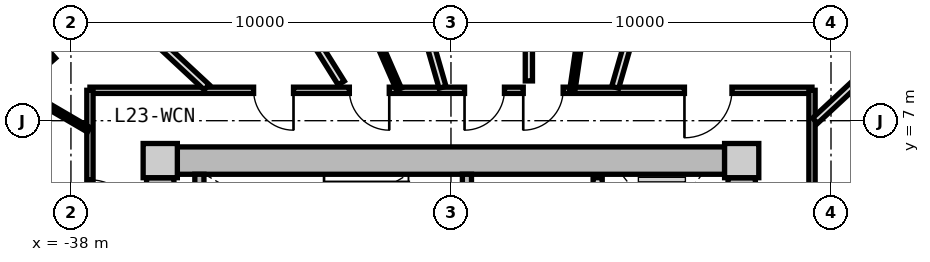
"""IFC4 building model, lengths in metres.
Left out: names, types, materials, properties, quantities, classifications, styles, units other than length and angle.
Written with IfcOpenShell. Run it as: python <this file> out.ifc"""

import sys

from ifc_helpers import new_model, si_unit, direction, frame, frame_2d, origin, origin_2d, place, context, subcontext, project, spatial, rectangle, extrude, source, transform, mapped, element, fill, save


model = new_model("IFC4")
c1 = context("Model", 3, precision=1e-05, world=origin(), true_north=direction((0.0, 1.0)))
c2 = subcontext(c1, "Body", "Model", "MODEL_VIEW")
j1 = project(units=[si_unit("LENGTHUNIT", "METRE"), si_unit("PLANEANGLEUNIT", "RADIAN")], contexts=[c1])
p1 = place(None, origin())
s1 = spatial("IfcSite", under=j1, at=p1, CompositionType="ELEMENT")
p2 = place(p1, origin())
s2 = spatial("IfcBuilding", under=s1, at=p2, CompositionType="ELEMENT")
p3 = place(p2, frame((0.0, 0.0, 77.95)))
s3 = spatial("IfcBuildingStorey", under=s2, at=p3, CompositionType="ELEMENT", Elevation=77.95)
m1 = source(origin(), c2, "Body", "SweptSolid", [
    extrude(rectangle(XDim=0.9, YDim=0.9, at=origin_2d()), origin(), (0.0, 0.0, 1.0), 3.05),
])
for number, where, z_axis, x_axis in (
    (1, (-20.35, 5.95, 0.0), (0.0, 0.0, 1.0), (1.0, 0.0, 0.0)),
    (2, (-35.65, 5.95, 0.0), (0.0, 0.0, 1.0), (1.0, 0.0, 0.0)),
):
    element("IfcColumn", number, at=place(p3, frame(where, z_axis=z_axis, x_axis=x_axis)), inside=s3, PredefinedType="COLUMN", context=c2, shape_type="MappedRepresentation", body=[
        mapped(m1, transform((0.0, 0.0, 0.0), x_axis=(1.0, 0.0, 0.0), y_axis=(0.0, 1.0, 0.0), z_axis=(0.0, 0.0, 1.0), scale=1.0)),
    ])
m2 = source(origin(), c2, "Body", "SweptSolid", [
    extrude(rectangle(XDim=14.4, YDim=0.72, at=frame_2d((7.2, 0.0))), origin(), (0.0, 0.0, 1.0), 2.79),
])
p4 = place(p3, frame((-35.2, 5.95, 0.0), z_axis=(0.0, 0.0, 1.0), x_axis=(1.0, 0.0, 0.0)))
e3 = element("IfcWall", 3, at=p4, inside=s3, PredefinedType="SHEAR", context=c2, shape_type="MappedRepresentation", body=[
    mapped(m2, transform((0.0, 0.0, 0.0), x_axis=(1.0, 0.0, 0.0), y_axis=(0.0, 1.0, 0.0), z_axis=(0.0, 0.0, 1.0), scale=1.0)),
])
m3 = source(origin(), c2, "Body", "SweptSolid", [
    extrude(rectangle(XDim=11.0, YDim=0.72, at=frame_2d((5.5, 0.0))), origin(), (0.0, 0.0, 1.0), 2.79),
])
p5 = place(p3, frame((-35.65, -5.5, 0.0), z_axis=(0.0, 0.0, 1.0), x_axis=(0.0, 1.0, 0.0)))
e4 = element("IfcWall", 4, at=p5, inside=s3, PredefinedType="SHEAR", context=c2, shape_type="MappedRepresentation", body=[
    mapped(m3, transform((0.0, 0.0, 0.0), x_axis=(1.0, 0.0, 0.0), y_axis=(0.0, 1.0, 0.0), z_axis=(0.0, 0.0, 1.0), scale=1.0)),
])
p6 = place(p5, frame((3.8, 0.0, 0.0)))
e5 = element("IfcOpeningElement", 5, at=p6, cuts=e4, PredefinedType="OPENING", context=c2, shape_type="SweptSolid", body=[
    extrude(rectangle(XDim=1.2, YDim=2.15, at=frame_2d((0.6, 1.075))), frame((0.0, 0.37, 0.0), z_axis=(0.0, -1.0, 0.0), x_axis=(1.0, 0.0, 0.0)), (0.0, 0.0, 1.0), 0.74),
])
p7 = place(p3, frame((-20.35, 5.5, 0.0), z_axis=(0.0, 0.0, 1.0), x_axis=(0.0, -1.0, 0.0)))
e6 = element("IfcWall", 6, at=p7, inside=s3, PredefinedType="SHEAR", context=c2, shape_type="MappedRepresentation", body=[
    mapped(m3, transform((0.0, 0.0, 0.0), x_axis=(1.0, 0.0, 0.0), y_axis=(0.0, 1.0, 0.0), z_axis=(0.0, 0.0, 1.0), scale=1.0)),
])
p8 = place(p7, frame((5.65, 0.0, 0.0)))
e7 = element("IfcOpeningElement", 7, at=p8, cuts=e6, PredefinedType="OPENING", context=c2, shape_type="SweptSolid", body=[
    extrude(rectangle(XDim=1.2, YDim=2.15, at=frame_2d((0.6, 1.075))), frame((0.0, 0.37, 0.0), z_axis=(0.0, -1.0, 0.0), x_axis=(1.0, 0.0, 0.0)), (0.0, 0.0, 1.0), 0.74),
])
p9 = place(p7, frame((9.3, 0.0, 0.0)))
e8 = element("IfcOpeningElement", 8, at=p9, cuts=e6, PredefinedType="OPENING", context=c2, shape_type="SweptSolid", body=[
    extrude(rectangle(XDim=1.0, YDim=2.1, at=frame_2d((0.5, 1.05))), frame((0.0, 0.37, 0.0), z_axis=(0.0, -1.0, 0.0), x_axis=(1.0, 0.0, 0.0)), (0.0, 0.0, 1.0), 0.74),
])
m4 = source(origin(), c2, "Body", "SweptSolid", [
    extrude(rectangle(XDim=3.14, YDim=0.24, at=frame_2d((1.57, 0.0))), origin(), (0.0, 0.0, 1.0), 2.79),
])
p10 = place(p3, frame((-34.62, 2.45, 0.0), z_axis=(0.0, 0.0, 1.0), x_axis=(0.0, 1.0, 0.0)))
e9 = element("IfcWall", 9, at=p10, inside=s3, PredefinedType="PARTITIONING", context=c2, shape_type="MappedRepresentation", body=[
    mapped(m4, transform((0.0, 0.0, 0.0), x_axis=(1.0, 0.0, 0.0), y_axis=(0.0, 1.0, 0.0), z_axis=(0.0, 0.0, 1.0), scale=1.0)),
])
p11 = place(p3, frame((-27.58, 2.45, 0.0), z_axis=(0.0, 0.0, 1.0), x_axis=(0.0, 1.0, 0.0)))
e10 = element("IfcWall", 10, at=p11, inside=s3, PredefinedType="PARTITIONING", context=c2, shape_type="MappedRepresentation", body=[
    mapped(m4, transform((0.0, 0.0, 0.0), x_axis=(1.0, 0.0, 0.0), y_axis=(0.0, 1.0, 0.0), z_axis=(0.0, 0.0, 1.0), scale=1.0)),
])
p12 = place(p11, frame((0.55, 0.0, 0.0)))
e11 = element("IfcOpeningElement", 11, at=p12, cuts=e10, PredefinedType="OPENING", context=c2, shape_type="SweptSolid", body=[
    extrude(rectangle(XDim=1.1, YDim=2.15, at=frame_2d((0.55, 1.075))), frame((0.0, 0.13, 0.0), z_axis=(0.0, -1.0, 0.0), x_axis=(1.0, 0.0, 0.0)), (0.0, 0.0, 1.0), 0.26),
])
m5 = source(origin(), c2, "Body", "SweptSolid", [
    extrude(rectangle(XDim=5.0, YDim=0.24, at=frame_2d((2.5, 0.0))), origin(), (0.0, 0.0, 1.0), 2.775),
])
p13 = place(p3, frame((-24.14, 0.5, 0.0), z_axis=(0.0, 0.0, 1.0), x_axis=(0.0, 1.0, 0.0)))
e12 = element("IfcWall", 12, at=p13, inside=s3, PredefinedType="PARTITIONING", context=c2, shape_type="MappedRepresentation", body=[
    mapped(m5, transform((0.0, 0.0, 0.0), x_axis=(1.0, 0.0, 0.0), y_axis=(0.0, 1.0, 0.0), z_axis=(0.0, 0.0, 1.0), scale=1.0)),
])
p14 = place(p13, frame((3.05, 0.0, 0.0)))
e13 = element("IfcOpeningElement", 13, at=p14, cuts=e12, PredefinedType="OPENING", context=c2, shape_type="SweptSolid", body=[
    extrude(rectangle(XDim=1.3, YDim=2.2, at=frame_2d((0.65, 1.1))), frame((0.0, 0.13, 0.0), z_axis=(0.0, -1.0, 0.0), x_axis=(1.0, 0.0, 0.0)), (0.0, 0.0, 1.0), 0.26),
])
p15 = place(p13, frame((0.55, 0.0, 0.0)))
e14 = element("IfcOpeningElement", 14, at=p15, cuts=e12, PredefinedType="OPENING", context=c2, shape_type="SweptSolid", body=[
    extrude(rectangle(XDim=1.3, YDim=2.2, at=frame_2d((0.65, 1.1))), frame((0.0, 0.13, 0.0), z_axis=(0.0, -1.0, 0.0), x_axis=(1.0, 0.0, 0.0)), (0.0, 0.0, 1.0), 0.26),
])
m6 = source(origin(), c2, "Body", "SweptSolid", [
    extrude(rectangle(XDim=19.0, YDim=0.165, at=frame_2d((9.5, 0.0))), origin(), (0.0, 0.0, 1.0), 2.775),
])
p16 = place(p3, frame((-37.5, 7.8, 0.0), z_axis=(0.0, 0.0, 1.0), x_axis=(1.0, 0.0, 0.0)))
e15 = element("IfcWall", 15, at=p16, inside=s3, PredefinedType="PARTITIONING", context=c2, shape_type="MappedRepresentation", body=[
    mapped(m6, transform((0.0, 0.0, 0.0), x_axis=(1.0, 0.0, 0.0), y_axis=(0.0, 1.0, 0.0), z_axis=(0.0, 0.0, 1.0), scale=1.0)),
])
p17 = place(p16, frame((15.644, 0.0, 0.0)))
e16 = element("IfcOpeningElement", 16, at=p17, cuts=e15, PredefinedType="OPENING", context=c2, shape_type="SweptSolid", body=[
    extrude(rectangle(XDim=1.25, YDim=2.2, at=frame_2d((0.625, 1.1))), frame((0.0, 0.093, 0.0), z_axis=(0.0, -1.0, 0.0), x_axis=(1.0, 0.0, 0.0)), (0.0, 0.0, 1.0), 0.185),
])
p18 = place(p16, frame((11.402, 0.0, 0.0)))
e17 = element("IfcOpeningElement", 17, at=p18, cuts=e15, PredefinedType="OPENING", context=c2, shape_type="SweptSolid", body=[
    extrude(rectangle(XDim=1.05, YDim=2.15, at=frame_2d((0.525, 1.075))), frame((0.0, 0.093, 0.0), z_axis=(0.0, -1.0, 0.0), x_axis=(1.0, 0.0, 0.0)), (0.0, 0.0, 1.0), 0.185),
])
p19 = place(p16, frame((9.857, 0.0, 0.0)))
e18 = element("IfcOpeningElement", 18, at=p19, cuts=e15, PredefinedType="OPENING", context=c2, shape_type="SweptSolid", body=[
    extrude(rectangle(XDim=1.05, YDim=2.15, at=frame_2d((0.525, 1.075))), frame((0.0, 0.093, 0.0), z_axis=(0.0, -1.0, 0.0), x_axis=(1.0, 0.0, 0.0)), (0.0, 0.0, 1.0), 0.185),
])
p20 = place(p16, frame((6.826, 0.0, 0.0)))
e19 = element("IfcOpeningElement", 19, at=p20, cuts=e15, PredefinedType="OPENING", context=c2, shape_type="SweptSolid", body=[
    extrude(rectangle(XDim=1.05, YDim=2.15, at=frame_2d((0.525, 1.075))), frame((0.0, 0.093, 0.0), z_axis=(0.0, -1.0, 0.0), x_axis=(1.0, 0.0, 0.0)), (0.0, 0.0, 1.0), 0.185),
])
p21 = place(p16, frame((4.307, 0.0, 0.0)))
e20 = element("IfcOpeningElement", 20, at=p21, cuts=e15, PredefinedType="OPENING", context=c2, shape_type="SweptSolid", body=[
    extrude(rectangle(XDim=1.05, YDim=2.15, at=frame_2d((0.525, 1.075))), frame((0.0, 0.093, 0.0), z_axis=(0.0, -1.0, 0.0), x_axis=(1.0, 0.0, 0.0)), (0.0, 0.0, 1.0), 0.185),
])
m7 = source(origin(), c2, "Body", "SweptSolid", [
    extrude(rectangle(XDim=15.6, YDim=0.165, at=frame_2d((7.8, 0.0))), origin(), (0.0, 0.0, 1.0), 2.775),
])
p22 = place(p3, frame((-37.5, -7.8, 0.0), z_axis=(0.0, 0.0, 1.0), x_axis=(0.0, 1.0, 0.0)))
e21 = element("IfcWall", 21, at=p22, inside=s3, PredefinedType="PARTITIONING", context=c2, shape_type="MappedRepresentation", body=[
    mapped(m7, transform((0.0, 0.0, 0.0), x_axis=(1.0, 0.0, 0.0), y_axis=(0.0, 1.0, 0.0), z_axis=(0.0, 0.0, 1.0), scale=1.0)),
])
p23 = place(p22, frame((11.994, 0.0, 0.0)))
e22 = element("IfcOpeningElement", 22, at=p23, cuts=e21, PredefinedType="OPENING", context=c2, shape_type="SweptSolid", body=[
    extrude(rectangle(XDim=1.25, YDim=2.2, at=frame_2d((0.625, 1.1))), frame((0.0, 0.093, 0.0), z_axis=(0.0, -1.0, 0.0), x_axis=(1.0, 0.0, 0.0)), (0.0, 0.0, 1.0), 0.185),
])
p24 = place(p22, frame((8.723, 0.0, 0.0)))
e23 = element("IfcOpeningElement", 23, at=p24, cuts=e21, PredefinedType="OPENING", context=c2, shape_type="SweptSolid", body=[
    extrude(rectangle(XDim=1.05, YDim=2.15, at=frame_2d((0.525, 1.075))), frame((0.0, 0.093, 0.0), z_axis=(0.0, -1.0, 0.0), x_axis=(1.0, 0.0, 0.0)), (0.0, 0.0, 1.0), 0.185),
])
p25 = place(p22, frame((5.777, 0.0, 0.0)))
e24 = element("IfcOpeningElement", 24, at=p25, cuts=e21, PredefinedType="OPENING", context=c2, shape_type="SweptSolid", body=[
    extrude(rectangle(XDim=1.05, YDim=2.15, at=frame_2d((0.525, 1.075))), frame((0.0, 0.093, 0.0), z_axis=(0.0, -1.0, 0.0), x_axis=(1.0, 0.0, 0.0)), (0.0, 0.0, 1.0), 0.185),
])
p26 = place(p22, frame((2.676, 0.0, 0.0)))
e25 = element("IfcOpeningElement", 25, at=p26, cuts=e21, PredefinedType="OPENING", context=c2, shape_type="SweptSolid", body=[
    extrude(rectangle(XDim=1.05, YDim=2.15, at=frame_2d((0.525, 1.075))), frame((0.0, 0.093, 0.0), z_axis=(0.0, -1.0, 0.0), x_axis=(1.0, 0.0, 0.0)), (0.0, 0.0, 1.0), 0.185),
])
p27 = place(p3, frame((-18.5, 7.8, 0.0), z_axis=(0.0, 0.0, 1.0), x_axis=(0.0, -1.0, 0.0)))
e26 = element("IfcWall", 26, at=p27, inside=s3, PredefinedType="PARTITIONING", context=c2, shape_type="MappedRepresentation", body=[
    mapped(m7, transform((0.0, 0.0, 0.0), x_axis=(1.0, 0.0, 0.0), y_axis=(0.0, 1.0, 0.0), z_axis=(0.0, 0.0, 1.0), scale=1.0)),
])
p28 = place(p27, frame((11.664, 0.0, 0.0)))
e27 = element("IfcOpeningElement", 27, at=p28, cuts=e26, PredefinedType="OPENING", context=c2, shape_type="SweptSolid", body=[
    extrude(rectangle(XDim=1.25, YDim=2.2, at=frame_2d((0.625, 1.1))), frame((0.0, 0.093, 0.0), z_axis=(0.0, -1.0, 0.0), x_axis=(1.0, 0.0, 0.0)), (0.0, 0.0, 1.0), 0.185),
])
p29 = place(p27, frame((7.175, 0.0, 0.0)))
e28 = element("IfcOpeningElement", 28, at=p29, cuts=e26, PredefinedType="OPENING", context=c2, shape_type="SweptSolid", body=[
    extrude(rectangle(XDim=1.25, YDim=2.2, at=frame_2d((0.625, 1.1))), frame((0.0, 0.093, 0.0), z_axis=(0.0, -1.0, 0.0), x_axis=(1.0, 0.0, 0.0)), (0.0, 0.0, 1.0), 0.185),
])
p30 = place(p27, frame((2.686, 0.0, 0.0)))
e29 = element("IfcOpeningElement", 29, at=p30, cuts=e26, PredefinedType="OPENING", context=c2, shape_type="SweptSolid", body=[
    extrude(rectangle(XDim=1.25, YDim=2.2, at=frame_2d((0.625, 1.1))), frame((0.0, 0.093, 0.0), z_axis=(0.0, -1.0, 0.0), x_axis=(1.0, 0.0, 0.0)), (0.0, 0.0, 1.0), 0.185),
])
m8 = source(origin(), c2, "Body", "SweptSolid", [
    extrude(rectangle(XDim=7.482, YDim=0.19, at=frame_2d((3.741, 0.0))), origin(), (0.0, 0.0, 1.0), 2.275),
])
p31 = place(p3, frame((-18.42, 6.998, 0.0), z_axis=(0.0, 0.0, 1.0), x_axis=(0.732508698043, 0.680757671489, 0.0)))
e30 = element("IfcWall", 30, at=p31, inside=s3, PredefinedType="PARTITIONING", context=c2, shape_type="MappedRepresentation", body=[
    mapped(m8, transform((0.0, 0.0, 0.0), x_axis=(1.0, 0.0, 0.0), y_axis=(0.0, 1.0, 0.0), z_axis=(0.0, 0.0, 1.0), scale=1.0)),
])
m9 = source(origin(), c2, "Body", "SweptSolid", [
    extrude(rectangle(XDim=8.989, YDim=0.19, at=frame_2d((4.495, 0.0))), origin(), (0.0, 0.0, 1.0), 2.275),
])
for number, where, z_axis, x_axis in (
    (31, (-23.678, 7.88, 0.0), (0.0, 0.0, 1.0), (0.277, 0.961, 0.0)),
    (32, (-28.222, 7.88, 0.0), (0.0, 0.0, 1.0), (-0.277, 0.961, 0.0)),
):
    element("IfcWall", number, at=place(p3, frame(where, z_axis=z_axis, x_axis=x_axis)), inside=s3, PredefinedType="PARTITIONING", context=c2, shape_type="MappedRepresentation", body=[
        mapped(m9, transform((0.0, 0.0, 0.0), x_axis=(1.0, 0.0, 0.0), y_axis=(0.0, 1.0, 0.0), z_axis=(0.0, 0.0, 1.0), scale=1.0)),
    ])
m10 = source(origin(), c2, "Body", "SweptSolid", [
    extrude(rectangle(XDim=8.47, YDim=0.19, at=frame_2d((4.235, 0.0))), origin(), (0.0, 0.0, 1.0), 2.775),
])
p32 = place(p3, frame((-25.95, 8.047, 0.0), z_axis=(0.0, 0.0, 1.0), x_axis=(0.0, 1.0, 0.0)))
e33 = element("IfcWall", 33, at=p32, inside=s3, PredefinedType="PARTITIONING", context=c2, shape_type="MappedRepresentation", body=[
    mapped(m10, transform((0.0, 0.0, 0.0), x_axis=(1.0, 0.0, 0.0), y_axis=(0.0, 1.0, 0.0), z_axis=(0.0, 0.0, 1.0), scale=1.0)),
])
m11 = source(origin(), c2, "Body", "SweptSolid", [
    extrude(rectangle(XDim=3.86, YDim=0.14, at=frame_2d((1.93, 0.0))), origin(), (0.0, 0.0, 1.0), 2.275),
])
p33 = place(p3, frame((-24.802, 7.83, 0.0), z_axis=(0.0, 0.0, 1.0), x_axis=(0.145042357075, 0.989425446739, 0.0)))
e34 = element("IfcWall", 34, at=p33, inside=s3, PredefinedType="PARTITIONING", context=c2, shape_type="MappedRepresentation", body=[
    mapped(m11, transform((0.0, 0.0, 0.0), x_axis=(1.0, 0.0, 0.0), y_axis=(0.0, 1.0, 0.0), z_axis=(0.0, 0.0, 1.0), scale=1.0)),
])
p34 = place(p33, frame((1.47, 0.0, 0.0)))
e35 = element("IfcOpeningElement", 35, at=p34, cuts=e34, PredefinedType="OPENING", context=c2, shape_type="SweptSolid", body=[
    extrude(rectangle(XDim=0.92, YDim=2.1, at=frame_2d((0.46, 1.05))), frame((0.0, 0.08, 0.0), z_axis=(0.0, -1.0, 0.0), x_axis=(1.0, 0.0, 0.0)), (0.0, 0.0, 1.0), 0.16),
])
m12 = source(origin(), c2, "Body", "SweptSolid", [
    extrude(rectangle(XDim=6.187, YDim=0.19, at=frame_2d((3.093, 0.0))), origin(), (0.0, 0.0, 1.0), 2.275),
])
p35 = place(p3, frame((-34.429, 7.88, 0.0), z_axis=(0.0, 0.0, 1.0), x_axis=(-0.732501077882, 0.680765870841, 0.0)))
e36 = element("IfcWall", 36, at=p35, inside=s3, PredefinedType="PARTITIONING", context=c2, shape_type="MappedRepresentation", body=[
    mapped(m12, transform((0.0, 0.0, 0.0), x_axis=(1.0, 0.0, 0.0), y_axis=(0.0, 1.0, 0.0), z_axis=(0.0, 0.0, 1.0), scale=1.0)),
])
m13 = source(origin(), c2, "Body", "SweptSolid", [
    extrude(rectangle(XDim=7.446, YDim=0.19, at=frame_2d((3.723, 0.0))), origin(), (0.0, 0.0, 1.0), 2.775),
])
p36 = place(p3, frame((-30.888, 7.992, 0.0), z_axis=(0.0, 0.0, 1.0), x_axis=(-0.530320174828, 0.847797447608, 0.0)))
e37 = element("IfcWall", 37, at=p36, inside=s3, PredefinedType="PARTITIONING", context=c2, shape_type="MappedRepresentation", body=[
    mapped(m13, transform((0.0, 0.0, 0.0), x_axis=(1.0, 0.0, 0.0), y_axis=(0.0, 1.0, 0.0), z_axis=(0.0, 0.0, 1.0), scale=1.0)),
])
m14 = source(origin(), c2, "Body", "SweptSolid", [
    extrude(rectangle(XDim=3.656, YDim=0.14, at=frame_2d((1.828, 0.0))), origin(), (0.0, 0.0, 1.0), 2.775),
])
p37 = place(p3, frame((-29.369, 7.83, 0.0), z_axis=(0.0, 0.0, 1.0), x_axis=(-0.400212690223, 0.916422283985, 0.0)))
e38 = element("IfcWall", 38, at=p37, inside=s3, PredefinedType="PARTITIONING", context=c2, shape_type="MappedRepresentation", body=[
    mapped(m14, transform((0.0, 0.0, 0.0), x_axis=(1.0, 0.0, 0.0), y_axis=(0.0, 1.0, 0.0), z_axis=(0.0, 0.0, 1.0), scale=1.0)),
])
p38 = place(p37, frame((1.368, 0.0, 0.0)))
e39 = element("IfcOpeningElement", 39, at=p38, cuts=e38, PredefinedType="OPENING", context=c2, shape_type="SweptSolid", body=[
    extrude(rectangle(XDim=0.92, YDim=2.1, at=frame_2d((0.46, 1.05))), frame((0.0, 0.08, 0.0), z_axis=(0.0, -1.0, 0.0), x_axis=(1.0, 0.0, 0.0)), (0.0, 0.0, 1.0), 0.16),
])
m15 = source(origin(), c2, "Body", "SweptSolid", [
    extrude(rectangle(XDim=2.172, YDim=0.14, at=frame_2d((1.086, 0.0))), origin(), (0.0, 0.0, 1.0), 2.775),
])
p39 = place(p3, frame((-37.53, 6.762, 0.0), z_axis=(0.0, 0.0, 1.0), x_axis=(-0.863562702562, 0.504241468688, 0.0)))
e40 = element("IfcWall", 40, at=p39, inside=s3, PredefinedType="PARTITIONING", context=c2, shape_type="MappedRepresentation", body=[
    mapped(m15, transform((0.0, 0.0, 0.0), x_axis=(1.0, 0.0, 0.0), y_axis=(0.0, 1.0, 0.0), z_axis=(0.0, 0.0, 1.0), scale=1.0)),
])
m16 = source(origin(), c2, "Body", "SweptSolid", [
    extrude(rectangle(XDim=3.462, YDim=0.14, at=frame_2d((1.731, 0.0))), origin(), (0.0, 0.0, 1.0), 2.775),
])
p40 = place(p3, frame((-39.405, 7.857, 0.0), z_axis=(0.0, 0.0, 1.0), x_axis=(0.75036232563, 0.661026762148, 0.0)))
e41 = element("IfcWall", 41, at=p40, inside=s3, PredefinedType="PARTITIONING", context=c2, shape_type="MappedRepresentation", body=[
    mapped(m16, transform((0.0, 0.0, 0.0), x_axis=(1.0, 0.0, 0.0), y_axis=(0.0, 1.0, 0.0), z_axis=(0.0, 0.0, 1.0), scale=1.0)),
])
p41 = place(p40, frame((1.271, 0.0, 0.0)))
e42 = element("IfcOpeningElement", 42, at=p41, cuts=e41, PredefinedType="OPENING", context=c2, shape_type="SweptSolid", body=[
    extrude(rectangle(XDim=0.92, YDim=2.1, at=frame_2d((0.46, 1.05))), frame((0.0, 0.08, 0.0), z_axis=(0.0, -1.0, 0.0), x_axis=(1.0, 0.0, 0.0)), (0.0, 0.0, 1.0), 0.16),
])
m17 = source(origin(), c2, "Body", "SweptSolid", [
    extrude(rectangle(XDim=1.25, YDim=2.2, at=frame_2d((0.625, 1.1))), frame((0.0, 0.025, 0.0), z_axis=(0.0, -1.0, 0.0), x_axis=(1.0, 0.0, 0.0)), (0.0, 0.0, 1.0), 0.05),
])
p42 = place(p17, frame((1.25, 0.0, 0.0), z_axis=(0.0, 0.0, 1.0), x_axis=(-1.0, 0.0, 0.0)))
e43 = element("IfcDoor", 43, at=p42, inside=s3, OperationType="SINGLE_SWING_RIGHT", PredefinedType="DOOR", context=c2, shape_type="MappedRepresentation", body=[
    mapped(m17, transform((0.0, 0.0, 0.0), x_axis=(1.0, 0.0, 0.0), y_axis=(0.0, 1.0, 0.0), z_axis=(0.0, 0.0, 1.0), scale=1.0)),
])
fill(e16, e43)
m18 = source(origin(), c2, "Body", "SweptSolid", [
    extrude(rectangle(XDim=1.05, YDim=2.15, at=frame_2d((0.525, 1.075))), frame((0.0, 0.025, 0.0), z_axis=(0.0, -1.0, 0.0), x_axis=(1.0, 0.0, 0.0)), (0.0, 0.0, 1.0), 0.05),
])
p43 = place(p18, frame((1.05, 0.0, 0.0), z_axis=(0.0, 0.0, 1.0), x_axis=(-1.0, 0.0, 0.0)))
e44 = element("IfcDoor", 44, at=p43, inside=s3, OperationType="SINGLE_SWING_RIGHT", PredefinedType="DOOR", context=c2, shape_type="MappedRepresentation", body=[
    mapped(m18, transform((0.0, 0.0, 0.0), x_axis=(1.0, 0.0, 0.0), y_axis=(0.0, 1.0, 0.0), z_axis=(0.0, 0.0, 1.0), scale=1.0)),
])
fill(e17, e44)
p44 = place(p19, frame((1.05, 0.0, 0.0), z_axis=(0.0, 0.0, 1.0), x_axis=(-1.0, 0.0, 0.0)))
e45 = element("IfcDoor", 45, at=p44, inside=s3, OperationType="SINGLE_SWING_RIGHT", PredefinedType="DOOR", context=c2, shape_type="MappedRepresentation", body=[
    mapped(m18, transform((0.0, 0.0, 0.0), x_axis=(1.0, 0.0, 0.0), y_axis=(0.0, 1.0, 0.0), z_axis=(0.0, 0.0, 1.0), scale=1.0)),
])
fill(e18, e45)
p45 = place(p20, frame((1.05, 0.0, 0.0), z_axis=(0.0, 0.0, 1.0), x_axis=(-1.0, 0.0, 0.0)))
e46 = element("IfcDoor", 46, at=p45, inside=s3, OperationType="SINGLE_SWING_LEFT", PredefinedType="DOOR", context=c2, shape_type="MappedRepresentation", body=[
    mapped(m18, transform((0.0, 0.0, 0.0), x_axis=(1.0, 0.0, 0.0), y_axis=(0.0, 1.0, 0.0), z_axis=(0.0, 0.0, 1.0), scale=1.0)),
])
fill(e19, e46)
p46 = place(p21, frame((1.05, 0.0, 0.0), z_axis=(0.0, 0.0, 1.0), x_axis=(-1.0, 0.0, 0.0)))
e47 = element("IfcDoor", 47, at=p46, inside=s3, OperationType="SINGLE_SWING_LEFT", PredefinedType="DOOR", context=c2, shape_type="MappedRepresentation", body=[
    mapped(m18, transform((0.0, 0.0, 0.0), x_axis=(1.0, 0.0, 0.0), y_axis=(0.0, 1.0, 0.0), z_axis=(0.0, 0.0, 1.0), scale=1.0)),
])
fill(e20, e47)
p47 = place(p23, frame((1.25, 0.0, 0.0), z_axis=(0.0, 0.0, 1.0), x_axis=(-1.0, 0.0, 0.0)))
e48 = element("IfcDoor", 48, at=p47, inside=s3, OperationType="SINGLE_SWING_RIGHT", PredefinedType="DOOR", context=c2, shape_type="MappedRepresentation", body=[
    mapped(m17, transform((0.0, 0.0, 0.0), x_axis=(1.0, 0.0, 0.0), y_axis=(0.0, 1.0, 0.0), z_axis=(0.0, 0.0, 1.0), scale=1.0)),
])
fill(e22, e48)
m19 = source(origin(), c2, "Body", "SweptSolid", [
    extrude(rectangle(XDim=0.92, YDim=2.1, at=frame_2d((0.46, 1.05))), frame((0.0, 0.025, 0.0), z_axis=(0.0, -1.0, 0.0), x_axis=(1.0, 0.0, 0.0)), (0.0, 0.0, 1.0), 0.05),
])
p48 = place(p41, origin())
e49 = element("IfcDoor", 49, at=p48, inside=s3, OperationType="SINGLE_SWING_LEFT", PredefinedType="DOOR", context=c2, shape_type="MappedRepresentation", body=[
    mapped(m19, transform((0.0, 0.0, 0.0), x_axis=(1.0, 0.0, 0.0), y_axis=(0.0, 1.0, 0.0), z_axis=(0.0, 0.0, 1.0), scale=1.0)),
])
fill(e42, e49)
save(model, sys.argv[1])
